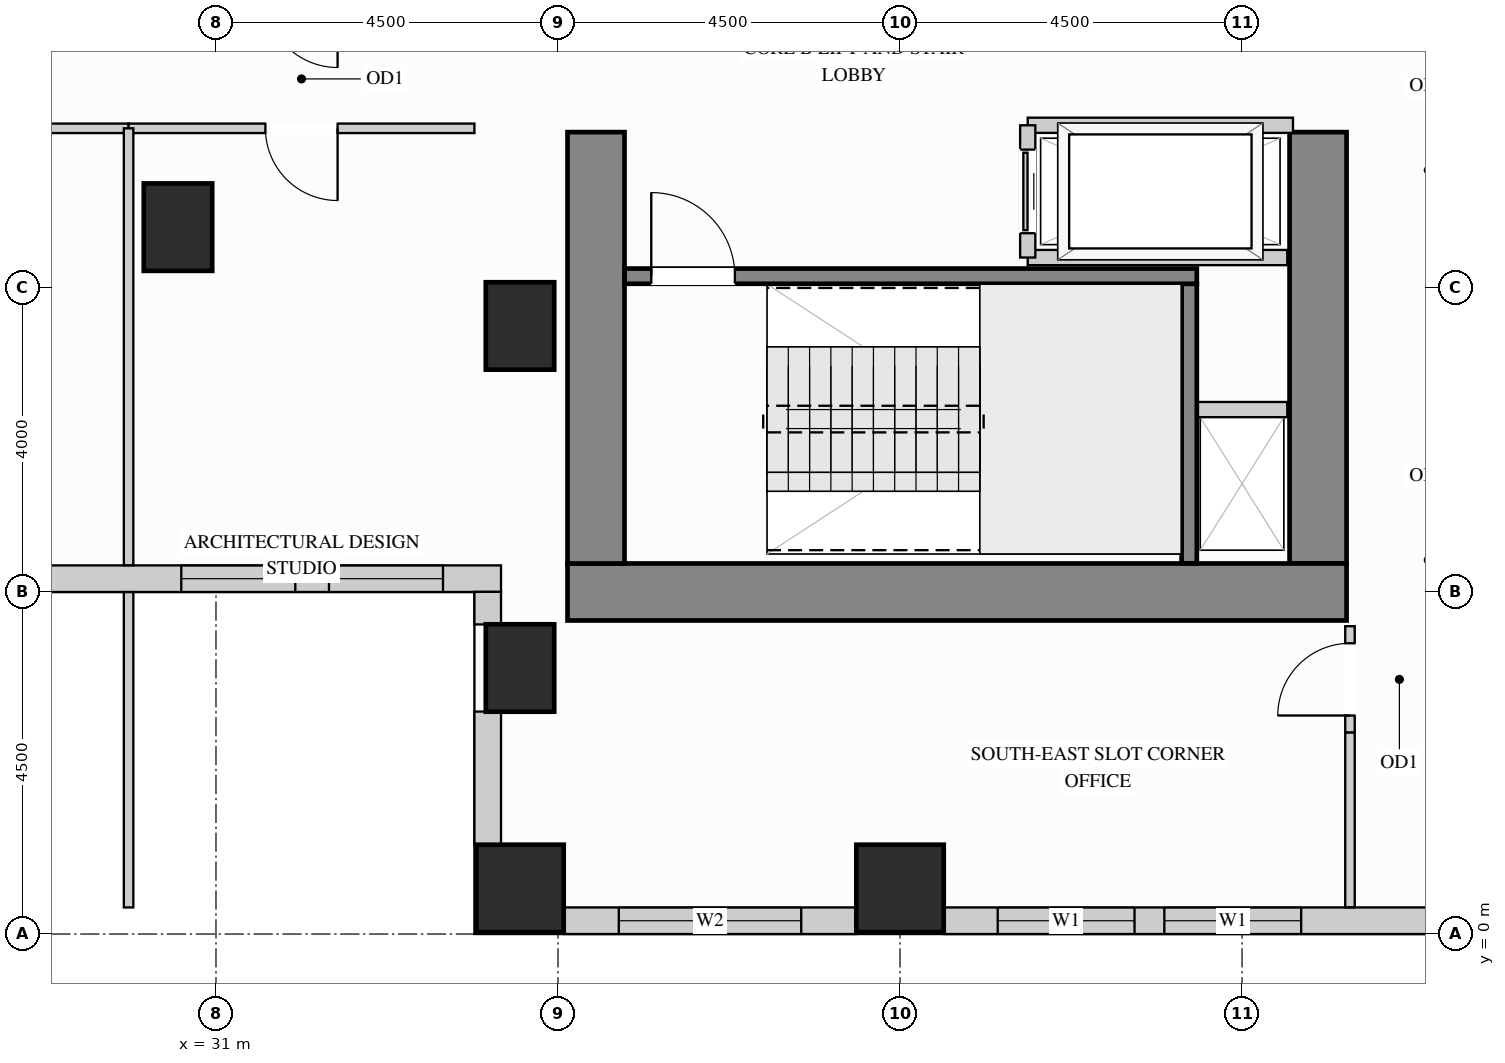
"""IFC4 building model, lengths in metres.
Left out: names, types, materials, properties, quantities, classifications, styles, units other than length and angle.
Written with IfcOpenShell. Run it as: python <this file> out.ifc"""

import sys

from ifc_helpers import new_model, si_unit, direction, frame, frame_2d, origin, origin_2d, place, context, subcontext, project, spatial, rectangle, extrude, source, transform, mapped, element, fill, save


model = new_model("IFC4")
c1 = context("Model", 3, precision=1e-05, world=origin(), true_north=direction((0.0, 1.0)))
c2 = subcontext(c1, "Body", "Model", "MODEL_VIEW")
j1 = project(units=[si_unit("LENGTHUNIT", "METRE"), si_unit("PLANEANGLEUNIT", "RADIAN")], contexts=[c1])
p1 = place(None, origin())
s1 = spatial("IfcSite", under=j1, at=p1, CompositionType="ELEMENT")
p2 = place(p1, origin())
s2 = spatial("IfcBuilding", under=s1, at=p2, CompositionType="ELEMENT")
p3 = place(p2, frame((0.0, 0.0, 84.6)))
s3 = spatial("IfcBuildingStorey", under=s2, at=p3, CompositionType="ELEMENT", Elevation=84.6)
m1 = source(origin(), c2, "Body", "SweptSolid", [
    extrude(rectangle(XDim=0.9, YDim=1.15, at=origin_2d()), origin(), (0.0, 0.0, 1.0), 3.38),
])
for number, where, z_axis, x_axis in (
    (1, (35.0, 3.5, 0.0), (0.0, 0.0, 1.0), (1.0, 0.0, 0.0)),
    (2, (35.0, 8.0, 0.0), (0.0, 0.0, 1.0), (1.0, 0.0, 0.0)),
    (3, (30.5, 9.3, 0.0), (0.0, 0.0, 1.0), (1.0, 0.0, 0.0)),
):
    element("IfcColumn", number, at=place(p3, frame(where, z_axis=z_axis, x_axis=x_axis)), inside=s3, PredefinedType="COLUMN", context=c2, shape_type="MappedRepresentation", body=[
        mapped(m1, transform((0.0, 0.0, 0.0), x_axis=(1.0, 0.0, 0.0), y_axis=(0.0, 1.0, 0.0), z_axis=(0.0, 0.0, 1.0))),
    ])
m2 = source(origin(), c2, "Body", "SweptSolid", [
    extrude(rectangle(XDim=1.15, YDim=1.15, at=origin_2d()), origin(), (0.0, 0.0, 1.0), 3.38),
])
for number, where, z_axis, x_axis in (
    (4, (35.0, 0.6, 0.0), (0.0, 0.0, 1.0), (1.0, 0.0, 0.0)),
    (5, (40.0, 0.6, 0.0), (0.0, 0.0, 1.0), (1.0, 0.0, 0.0)),
):
    element("IfcColumn", number, at=place(p3, frame(where, z_axis=z_axis, x_axis=x_axis)), inside=s3, PredefinedType="COLUMN", context=c2, shape_type="MappedRepresentation", body=[
        mapped(m2, transform((0.0, 0.0, 0.0), x_axis=(1.0, 0.0, 0.0), y_axis=(0.0, 1.0, 0.0), z_axis=(0.0, 0.0, 1.0))),
    ])
m3 = source(origin(), c2, "Body", "SweptSolid", [
    extrude(rectangle(XDim=5.675, YDim=0.75, at=frame_2d((2.837, 0.0))), origin(), (0.0, 0.0, 1.0), 3.38),
])
p4 = place(p3, frame((45.5, 4.875, 0.0), z_axis=(0.0, 0.0, 1.0), x_axis=(0.0, 1.0, 0.0)))
e6 = element("IfcWall", 6, at=p4, inside=s3, PredefinedType="SHEAR", context=c2, shape_type="MappedRepresentation", body=[
    mapped(m3, transform((0.0, 0.0, 0.0), x_axis=(1.0, 0.0, 0.0), y_axis=(0.0, 1.0, 0.0), z_axis=(0.0, 0.0, 1.0))),
])
m4 = source(origin(), c2, "Body", "SweptSolid", [
    extrude(rectangle(XDim=10.25, YDim=0.75, at=frame_2d((5.125, 0.0))), origin(), (0.0, 0.0, 1.0), 3.38),
])
p5 = place(p3, frame((35.625, 4.5, 0.0), z_axis=(0.0, 0.0, 1.0), x_axis=(1.0, 0.0, 0.0)))
e7 = element("IfcWall", 7, at=p5, inside=s3, PredefinedType="SHEAR", context=c2, shape_type="MappedRepresentation", body=[
    mapped(m4, transform((0.0, 0.0, 0.0), x_axis=(1.0, 0.0, 0.0), y_axis=(0.0, 1.0, 0.0), z_axis=(0.0, 0.0, 1.0))),
])
p6 = place(p3, frame((36.0, 4.875, 0.0), z_axis=(0.0, 0.0, 1.0), x_axis=(0.0, 1.0, 0.0)))
e8 = element("IfcWall", 8, at=p6, inside=s3, PredefinedType="SHEAR", context=c2, shape_type="MappedRepresentation", body=[
    mapped(m3, transform((0.0, 0.0, 0.0), x_axis=(1.0, 0.0, 0.0), y_axis=(0.0, 1.0, 0.0), z_axis=(0.0, 0.0, 1.0))),
])
p7 = place(p3, frame((19.15, 4.675, 0.0), z_axis=(0.0, 0.0, 1.0), x_axis=(1.0, 0.0, 0.0)))
e9 = element("IfcWall", 9, at=p7, inside=s3, PredefinedType="SOLIDWALL", context=c2, shape_type="SweptSolid", body=[
    extrude(rectangle(XDim=15.6, YDim=0.35, at=frame_2d((7.8, 0.0))), origin(), (0.0, 0.0, 1.0), 3.365),
])
p8 = place(p7, frame((0.697, 0.0, 0.78)))
e10 = element("IfcOpeningElement", 10, at=p8, cuts=e9, PredefinedType="OPENING", context=c2, shape_type="SweptSolid", body=[
    extrude(rectangle(XDim=1.5, YDim=2.0, at=frame_2d((0.75, 1.0))), frame((0.0, 0.185, 0.0), z_axis=(0.0, -1.0, 0.0), x_axis=(1.0, 0.0, 0.0)), (0.0, 0.0, 1.0), 0.37),
])
p9 = place(p7, frame((2.573, 0.0, 0.78)))
e11 = element("IfcOpeningElement", 11, at=p9, cuts=e9, PredefinedType="OPENING", context=c2, shape_type="SweptSolid", body=[
    extrude(rectangle(XDim=1.5, YDim=2.0, at=frame_2d((0.75, 1.0))), frame((0.0, 0.185, 0.0), z_axis=(0.0, -1.0, 0.0), x_axis=(1.0, 0.0, 0.0)), (0.0, 0.0, 1.0), 0.37),
])
p10 = place(p7, frame((5.783, 0.0, 0.78)))
e12 = element("IfcOpeningElement", 12, at=p10, cuts=e9, PredefinedType="OPENING", context=c2, shape_type="SweptSolid", body=[
    extrude(rectangle(XDim=1.5, YDim=2.0, at=frame_2d((0.75, 1.0))), frame((0.0, 0.185, 0.0), z_axis=(0.0, -1.0, 0.0), x_axis=(1.0, 0.0, 0.0)), (0.0, 0.0, 1.0), 0.37),
])
p11 = place(p7, frame((8.117, 0.0, 0.78)))
e13 = element("IfcOpeningElement", 13, at=p11, cuts=e9, PredefinedType="OPENING", context=c2, shape_type="SweptSolid", body=[
    extrude(rectangle(XDim=1.5, YDim=2.0, at=frame_2d((0.75, 1.0))), frame((0.0, 0.185, 0.0), z_axis=(0.0, -1.0, 0.0), x_axis=(1.0, 0.0, 0.0)), (0.0, 0.0, 1.0), 0.37),
])
p12 = place(p7, frame((11.393, 0.0, 0.78)))
e14 = element("IfcOpeningElement", 14, at=p12, cuts=e9, PredefinedType="OPENING", context=c2, shape_type="SweptSolid", body=[
    extrude(rectangle(XDim=1.5, YDim=2.0, at=frame_2d((0.75, 1.0))), frame((0.0, 0.185, 0.0), z_axis=(0.0, -1.0, 0.0), x_axis=(1.0, 0.0, 0.0)), (0.0, 0.0, 1.0), 0.37),
])
p13 = place(p7, frame((13.337, 0.0, 0.78)))
e15 = element("IfcOpeningElement", 15, at=p13, cuts=e9, PredefinedType="OPENING", context=c2, shape_type="SweptSolid", body=[
    extrude(rectangle(XDim=1.5, YDim=2.0, at=frame_2d((0.75, 1.0))), frame((0.0, 0.185, 0.0), z_axis=(0.0, -1.0, 0.0), x_axis=(1.0, 0.0, 0.0)), (0.0, 0.0, 1.0), 0.37),
])
m5 = source(origin(), c2, "Body", "SweptSolid", [
    extrude(rectangle(XDim=0.429, YDim=0.35, at=frame_2d((0.214, 0.0))), origin(), (0.0, 0.0, 1.0), 3.365),
])
p14 = place(p3, frame((34.575, 4.502, 0.0), z_axis=(0.0, 0.0, 1.0), x_axis=(0.0, -1.0, 0.0)))
e16 = element("IfcWall", 16, at=p14, inside=s3, PredefinedType="SOLIDWALL", context=c2, shape_type="MappedRepresentation", body=[
    mapped(m5, transform((0.0, 0.0, 0.0), x_axis=(1.0, 0.0, 0.0), y_axis=(0.0, 1.0, 0.0), z_axis=(0.0, 0.0, 1.0))),
])
m6 = source(origin(), c2, "Body", "SweptSolid", [
    extrude(rectangle(XDim=1.754, YDim=0.35, at=frame_2d((0.877, 0.0))), origin(), (0.0, 0.0, 1.0), 3.365),
])
p15 = place(p3, frame((34.575, 2.927, 0.0), z_axis=(0.0, 0.0, 1.0), x_axis=(0.0, -1.0, 0.0)))
e17 = element("IfcWall", 17, at=p15, inside=s3, PredefinedType="SOLIDWALL", context=c2, shape_type="MappedRepresentation", body=[
    mapped(m6, transform((0.0, 0.0, 0.0), x_axis=(1.0, 0.0, 0.0), y_axis=(0.0, 1.0, 0.0), z_axis=(0.0, 0.0, 1.0))),
])
p16 = place(p3, frame((35.573, 0.175, 0.0), z_axis=(0.0, 0.0, 1.0), x_axis=(1.0, 0.0, 0.0)))
e18 = element("IfcWall", 18, at=p16, inside=s3, PredefinedType="SOLIDWALL", context=c2, shape_type="SweptSolid", body=[
    extrude(rectangle(XDim=3.854, YDim=0.35, at=frame_2d((1.927, 0.0))), origin(), (0.0, 0.0, 1.0), 3.365),
])
p17 = place(p16, frame((0.727, 0.0, 0.78)))
e19 = element("IfcOpeningElement", 19, at=p17, cuts=e18, PredefinedType="OPENING", context=c2, shape_type="SweptSolid", body=[
    extrude(rectangle(XDim=2.4, YDim=2.1, at=frame_2d((1.2, 1.05))), frame((0.0, 0.185, 0.0), z_axis=(0.0, -1.0, 0.0), x_axis=(1.0, 0.0, 0.0)), (0.0, 0.0, 1.0), 0.37),
])
p18 = place(p3, frame((40.573, 0.175, 0.0), z_axis=(0.0, 0.0, 1.0), x_axis=(1.0, 0.0, 0.0)))
e20 = element("IfcWall", 20, at=p18, inside=s3, PredefinedType="SOLIDWALL", context=c2, shape_type="SweptSolid", body=[
    extrude(rectangle(XDim=6.454, YDim=0.35, at=frame_2d((3.227, 0.0))), origin(), (0.0, 0.0, 1.0), 3.365),
])
p19 = place(p18, frame((0.712, 0.0, 0.78)))
e21 = element("IfcOpeningElement", 21, at=p19, cuts=e20, PredefinedType="OPENING", context=c2, shape_type="SweptSolid", body=[
    extrude(rectangle(XDim=1.8, YDim=2.1, at=frame_2d((0.9, 1.05))), frame((0.0, 0.185, 0.0), z_axis=(0.0, -1.0, 0.0), x_axis=(1.0, 0.0, 0.0)), (0.0, 0.0, 1.0), 0.37),
])
p20 = place(p18, frame((2.905, 0.0, 0.78)))
e22 = element("IfcOpeningElement", 22, at=p20, cuts=e20, PredefinedType="OPENING", context=c2, shape_type="SweptSolid", body=[
    extrude(rectangle(XDim=1.8, YDim=2.1, at=frame_2d((0.9, 1.05))), frame((0.0, 0.185, 0.0), z_axis=(0.0, -1.0, 0.0), x_axis=(1.0, 0.0, 0.0)), (0.0, 0.0, 1.0), 0.37),
])
p21 = place(p3, frame((45.92, 2.65, 0.0), z_axis=(0.0, 0.0, 1.0), x_axis=(0.0, 1.0, 0.0)))
e23 = element("IfcWall", 23, at=p21, inside=s3, PredefinedType="PARTITIONING", context=c2, shape_type="SweptSolid", body=[
    extrude(rectangle(XDim=1.4, YDim=0.125, at=frame_2d((0.7, 0.0))), origin(), (0.0, 0.0, 1.0), 3.365),
])
p22 = place(p21, frame((0.225, 0.0, 0.0)))
e24 = element("IfcOpeningElement", 24, at=p22, cuts=e23, PredefinedType="OPENING", context=c2, shape_type="SweptSolid", body=[
    extrude(rectangle(XDim=0.95, YDim=2.15, at=frame_2d((0.475, 1.075))), frame((0.0, 0.073, 0.0), z_axis=(0.0, -1.0, 0.0), x_axis=(1.0, 0.0, 0.0)), (0.0, 0.0, 1.0), 0.145),
])
m7 = source(origin(), c2, "Body", "SweptSolid", [
    extrude(rectangle(XDim=2.298, YDim=0.125, at=frame_2d((1.149, 0.0))), origin(), (0.0, 0.0, 1.0), 3.365),
])
p23 = place(p3, frame((45.92, 0.352, 0.0), z_axis=(0.0, 0.0, 1.0), x_axis=(0.0, 1.0, 0.0)))
e25 = element("IfcWall", 25, at=p23, inside=s3, PredefinedType="PARTITIONING", context=c2, shape_type="MappedRepresentation", body=[
    mapped(m7, transform((0.0, 0.0, 0.0), x_axis=(1.0, 0.0, 0.0), y_axis=(0.0, 1.0, 0.0), z_axis=(0.0, 0.0, 1.0))),
])
p24 = place(p3, frame((23.85, 10.6, 0.0), z_axis=(0.0, 0.0, 1.0), x_axis=(1.0, 0.0, 0.0)))
e26 = element("IfcWall", 26, at=p24, inside=s3, PredefinedType="PARTITIONING", context=c2, shape_type="SweptSolid", body=[
    extrude(rectangle(XDim=6.0, YDim=0.125, at=frame_2d((3.0, 0.0))), origin(), (0.0, 0.0, 1.0), 3.365),
])
p25 = place(p24, frame((2.525, 0.0, 0.0)))
e27 = element("IfcOpeningElement", 27, at=p25, cuts=e26, PredefinedType="OPENING", context=c2, shape_type="SweptSolid", body=[
    extrude(rectangle(XDim=0.95, YDim=2.15, at=frame_2d((0.475, 1.075))), frame((0.0, 0.073, 0.0), z_axis=(0.0, -1.0, 0.0), x_axis=(1.0, 0.0, 0.0)), (0.0, 0.0, 1.0), 0.145),
])
p26 = place(p3, frame((29.85, 10.6, 0.0), z_axis=(0.0, 0.0, 1.0), x_axis=(1.0, 0.0, 0.0)))
e28 = element("IfcWall", 28, at=p26, inside=s3, PredefinedType="PARTITIONING", context=c2, shape_type="SweptSolid", body=[
    extrude(rectangle(XDim=4.55, YDim=0.125, at=frame_2d((2.275, 0.0))), origin(), (0.0, 0.0, 1.0), 3.365),
])
p27 = place(p26, frame((1.8, 0.0, 0.0)))
e29 = element("IfcOpeningElement", 29, at=p27, cuts=e28, PredefinedType="OPENING", context=c2, shape_type="SweptSolid", body=[
    extrude(rectangle(XDim=0.95, YDim=2.15, at=frame_2d((0.475, 1.075))), frame((0.0, 0.073, 0.0), z_axis=(0.0, -1.0, 0.0), x_axis=(1.0, 0.0, 0.0)), (0.0, 0.0, 1.0), 0.145),
])
m8 = source(origin(), c2, "Body", "SweptSolid", [
    extrude(rectangle(XDim=4.148, YDim=0.125, at=frame_2d((2.074, 0.0))), origin(), (0.0, 0.0, 1.0), 3.365),
])
p28 = place(p3, frame((29.85, 0.35, 0.0), z_axis=(0.0, 0.0, 1.0), x_axis=(0.0, 1.0, 0.0)))
e30 = element("IfcWall", 30, at=p28, inside=s3, PredefinedType="PARTITIONING", context=c2, shape_type="MappedRepresentation", body=[
    mapped(m8, transform((0.0, 0.0, 0.0), x_axis=(1.0, 0.0, 0.0), y_axis=(0.0, 1.0, 0.0), z_axis=(0.0, 0.0, 1.0))),
])
m9 = source(origin(), c2, "Body", "SweptSolid", [
    extrude(rectangle(XDim=5.748, YDim=0.125, at=frame_2d((2.874, 0.0))), origin(), (0.0, 0.0, 1.0), 3.365),
])
p29 = place(p3, frame((29.85, 4.852, 0.0), z_axis=(0.0, 0.0, 1.0), x_axis=(0.0, 1.0, 0.0)))
e31 = element("IfcWall", 31, at=p29, inside=s3, PredefinedType="PARTITIONING", context=c2, shape_type="MappedRepresentation", body=[
    mapped(m9, transform((0.0, 0.0, 0.0), x_axis=(1.0, 0.0, 0.0), y_axis=(0.0, 1.0, 0.0), z_axis=(0.0, 0.0, 1.0))),
])
m10 = source(origin(), c2, "Body", "SweptSolid", [
    extrude(rectangle(XDim=1.245, YDim=0.2, at=frame_2d((0.623, 0.0))), origin(), (0.0, 0.0, 1.0), 3.365),
])
p30 = place(p3, frame((43.85, 6.9, 0.0), z_axis=(0.0, 0.0, 1.0), x_axis=(1.0, 0.0, 0.0)))
e32 = element("IfcWall", 32, at=p30, inside=s3, PredefinedType="PARTITIONING", context=c2, shape_type="MappedRepresentation", body=[
    mapped(m10, transform((0.0, 0.0, 0.0), x_axis=(1.0, 0.0, 0.0), y_axis=(0.0, 1.0, 0.0), z_axis=(0.0, 0.0, 1.0))),
])
m11 = source(origin(), c2, "Body", "SweptSolid", [
    extrude(rectangle(XDim=3.49, YDim=0.2, at=frame_2d((1.745, 0.0))), origin(), (0.0, 0.0, 1.0), 3.365),
])
p31 = place(p3, frame((41.68, 10.64, 0.0), z_axis=(0.0, 0.0, 1.0), x_axis=(1.0, 0.0, 0.0)))
e33 = element("IfcWall", 33, at=p31, inside=s3, PredefinedType="PARTITIONING", context=c2, shape_type="MappedRepresentation", body=[
    mapped(m11, transform((0.0, 0.0, 0.0), x_axis=(1.0, 0.0, 0.0), y_axis=(0.0, 1.0, 0.0), z_axis=(0.0, 0.0, 1.0))),
])
m12 = source(origin(), c2, "Body", "SweptSolid", [
    extrude(rectangle(XDim=3.415, YDim=0.2, at=frame_2d((1.708, 0.0))), origin(), (0.0, 0.0, 1.0), 3.365),
])
p32 = place(p3, frame((41.68, 8.9, 0.0), z_axis=(0.0, 0.0, 1.0), x_axis=(1.0, 0.0, 0.0)))
e34 = element("IfcWall", 34, at=p32, inside=s3, PredefinedType="PARTITIONING", context=c2, shape_type="MappedRepresentation", body=[
    mapped(m12, transform((0.0, 0.0, 0.0), x_axis=(1.0, 0.0, 0.0), y_axis=(0.0, 1.0, 0.0), z_axis=(0.0, 0.0, 1.0))),
])
p33 = place(p3, frame((41.68, 8.9, 0.0), z_axis=(0.0, 0.0, 1.0), x_axis=(0.0, 1.0, 0.0)))
e35 = element("IfcWall", 35, at=p33, inside=s3, PredefinedType="PARTITIONING", context=c2, shape_type="SweptSolid", body=[
    extrude(rectangle(XDim=1.74, YDim=0.2, at=frame_2d((0.87, 0.0))), origin(), (0.0, 0.0, 1.0), 3.365),
])
p34 = place(p33, frame((0.32, 0.0, 0.0)))
e36 = element("IfcOpeningElement", 36, at=p34, cuts=e35, PredefinedType="OPENING", context=c2, shape_type="SweptSolid", body=[
    extrude(rectangle(XDim=1.1, YDim=2.2, at=frame_2d((0.55, 1.1))), frame((0.0, 0.11, 0.0), z_axis=(0.0, -1.0, 0.0), x_axis=(1.0, 0.0, 0.0)), (0.0, 0.0, 1.0), 0.22),
])
m13 = source(origin(), c2, "Body", "SweptSolid", [
    extrude(rectangle(XDim=3.678, YDim=0.2, at=frame_2d((1.839, 0.0))), origin(), (0.0, 0.0, 1.0), 3.38),
])
p35 = place(p3, frame((43.805, 4.877, 0.0), z_axis=(0.0, 0.0, 1.0), x_axis=(0.0, 1.0, 0.0)))
e37 = element("IfcWall", 37, at=p35, inside=s3, PredefinedType="SHEAR", context=c2, shape_type="MappedRepresentation", body=[
    mapped(m13, transform((0.0, 0.0, 0.0), x_axis=(1.0, 0.0, 0.0), y_axis=(0.0, 1.0, 0.0), z_axis=(0.0, 0.0, 1.0))),
])
p36 = place(p3, frame((36.377, 8.655, 0.0), z_axis=(0.0, 0.0, 1.0), x_axis=(1.0, 0.0, 0.0)))
e38 = element("IfcWall", 38, at=p36, inside=s3, PredefinedType="SHEAR", context=c2, shape_type="SweptSolid", body=[
    extrude(rectangle(XDim=7.528, YDim=0.2, at=frame_2d((3.764, 0.0))), origin(), (0.0, 0.0, 1.0), 3.38),
])
p37 = place(p36, frame((0.35, 0.0, 0.0)))
e39 = element("IfcOpeningElement", 39, at=p37, cuts=e38, PredefinedType="OPENING", context=c2, shape_type="SweptSolid", body=[
    extrude(rectangle(XDim=1.1, YDim=2.15, at=frame_2d((0.55, 1.075))), frame((0.0, 0.11, 0.0), z_axis=(0.0, -1.0, 0.0), x_axis=(1.0, 0.0, 0.0)), (0.0, 0.0, 1.0), 0.22),
])
m14 = source(origin(), c2, "Body", "SweptSolid", [
    extrude(rectangle(XDim=1.1, YDim=2.2, at=frame_2d((0.55, 1.1))), frame((0.0, 0.025, 0.0), z_axis=(0.0, -1.0, 0.0), x_axis=(1.0, 0.0, 0.0)), (0.0, 0.0, 1.0), 0.05),
])
p38 = place(p34, origin())
e40 = element("IfcDoor", 40, at=p38, inside=s3, OperationType="SLIDING_TO_LEFT", PredefinedType="DOOR", context=c2, shape_type="MappedRepresentation", body=[
    mapped(m14, transform((0.0, 0.0, 0.0), x_axis=(1.0, 0.0, 0.0), y_axis=(0.0, 1.0, 0.0), z_axis=(0.0, 0.0, 1.0))),
])
fill(e36, e40)
m15 = source(origin(), c2, "Body", "SweptSolid", [
    extrude(rectangle(XDim=0.95, YDim=2.15, at=frame_2d((0.475, 1.075))), frame((0.0, 0.025, 0.0), z_axis=(0.0, -1.0, 0.0), x_axis=(1.0, 0.0, 0.0)), (0.0, 0.0, 1.0), 0.05),
])
p39 = place(p22, origin())
e41 = element("IfcDoor", 41, at=p39, inside=s3, OperationType="SINGLE_SWING_LEFT", PredefinedType="DOOR", context=c2, shape_type="MappedRepresentation", body=[
    mapped(m15, transform((0.0, 0.0, 0.0), x_axis=(1.0, 0.0, 0.0), y_axis=(0.0, 1.0, 0.0), z_axis=(0.0, 0.0, 1.0))),
])
fill(e24, e41)
p40 = place(p27, origin())
e42 = element("IfcDoor", 42, at=p40, inside=s3, OperationType="SINGLE_SWING_RIGHT", PredefinedType="DOOR", context=c2, shape_type="MappedRepresentation", body=[
    mapped(m15, transform((0.0, 0.0, 0.0), x_axis=(1.0, 0.0, 0.0), y_axis=(0.0, 1.0, 0.0), z_axis=(0.0, 0.0, 1.0))),
])
fill(e29, e42)
m16 = source(origin(), c2, "Body", "SweptSolid", [
    extrude(rectangle(XDim=1.1, YDim=2.15, at=frame_2d((0.55, 1.075))), frame((0.0, 0.025, 0.0), z_axis=(0.0, -1.0, 0.0), x_axis=(1.0, 0.0, 0.0)), (0.0, 0.0, 1.0), 0.05),
])
p41 = place(p37, origin())
e43 = element("IfcDoor", 43, at=p41, inside=s3, OperationType="SINGLE_SWING_LEFT", PredefinedType="DOOR", context=c2, shape_type="MappedRepresentation", body=[
    mapped(m16, transform((0.0, 0.0, 0.0), x_axis=(1.0, 0.0, 0.0), y_axis=(0.0, 1.0, 0.0), z_axis=(0.0, 0.0, 1.0))),
])
fill(e39, e43)
m17 = source(origin(), c2, "Body", "SweptSolid", [
    extrude(rectangle(XDim=1.8, YDim=2.1, at=frame_2d((0.9, 1.05))), frame((0.0, 0.03, 0.0), z_axis=(0.0, -1.0, 0.0), x_axis=(1.0, 0.0, 0.0)), (0.0, 0.0, 1.0), 0.06),
])
p42 = place(p19, origin())
e44 = element("IfcWindow", 44, at=p42, inside=s3, PartitioningType="SINGLE_PANEL", PredefinedType="WINDOW", context=c2, shape_type="MappedRepresentation", body=[
    mapped(m17, transform((0.0, 0.0, 0.0), x_axis=(1.0, 0.0, 0.0), y_axis=(0.0, 1.0, 0.0), z_axis=(0.0, 0.0, 1.0))),
])
fill(e21, e44)
p43 = place(p20, origin())
e45 = element("IfcWindow", 45, at=p43, inside=s3, PartitioningType="SINGLE_PANEL", PredefinedType="WINDOW", context=c2, shape_type="MappedRepresentation", body=[
    mapped(m17, transform((0.0, 0.0, 0.0), x_axis=(1.0, 0.0, 0.0), y_axis=(0.0, 1.0, 0.0), z_axis=(0.0, 0.0, 1.0))),
])
fill(e22, e45)
m18 = source(origin(), c2, "Body", "SweptSolid", [
    extrude(rectangle(XDim=2.4, YDim=2.1, at=frame_2d((1.2, 1.05))), frame((0.0, 0.03, 0.0), z_axis=(0.0, -1.0, 0.0), x_axis=(1.0, 0.0, 0.0)), (0.0, 0.0, 1.0), 0.06),
])
p44 = place(p17, origin())
e46 = element("IfcWindow", 46, at=p44, inside=s3, PartitioningType="SINGLE_PANEL", PredefinedType="WINDOW", context=c2, shape_type="MappedRepresentation", body=[
    mapped(m18, transform((0.0, 0.0, 0.0), x_axis=(1.0, 0.0, 0.0), y_axis=(0.0, 1.0, 0.0), z_axis=(0.0, 0.0, 1.0))),
])
fill(e19, e46)
m19 = source(origin(), c2, "Body", "SweptSolid", [
    extrude(rectangle(XDim=1.5, YDim=2.0, at=frame_2d((0.75, 1.0))), frame((0.0, 0.03, 0.0), z_axis=(0.0, -1.0, 0.0), x_axis=(1.0, 0.0, 0.0)), (0.0, 0.0, 1.0), 0.06),
])
p45 = place(p12, origin())
e47 = element("IfcWindow", 47, at=p45, inside=s3, PartitioningType="SINGLE_PANEL", PredefinedType="WINDOW", context=c2, shape_type="MappedRepresentation", body=[
    mapped(m19, transform((0.0, 0.0, 0.0), x_axis=(1.0, 0.0, 0.0), y_axis=(0.0, 1.0, 0.0), z_axis=(0.0, 0.0, 1.0))),
])
fill(e14, e47)
p46 = place(p13, origin())
e48 = element("IfcWindow", 48, at=p46, inside=s3, PartitioningType="SINGLE_PANEL", PredefinedType="WINDOW", context=c2, shape_type="MappedRepresentation", body=[
    mapped(m19, transform((0.0, 0.0, 0.0), x_axis=(1.0, 0.0, 0.0), y_axis=(0.0, 1.0, 0.0), z_axis=(0.0, 0.0, 1.0))),
])
fill(e15, e48)
save(model, sys.argv[1])
